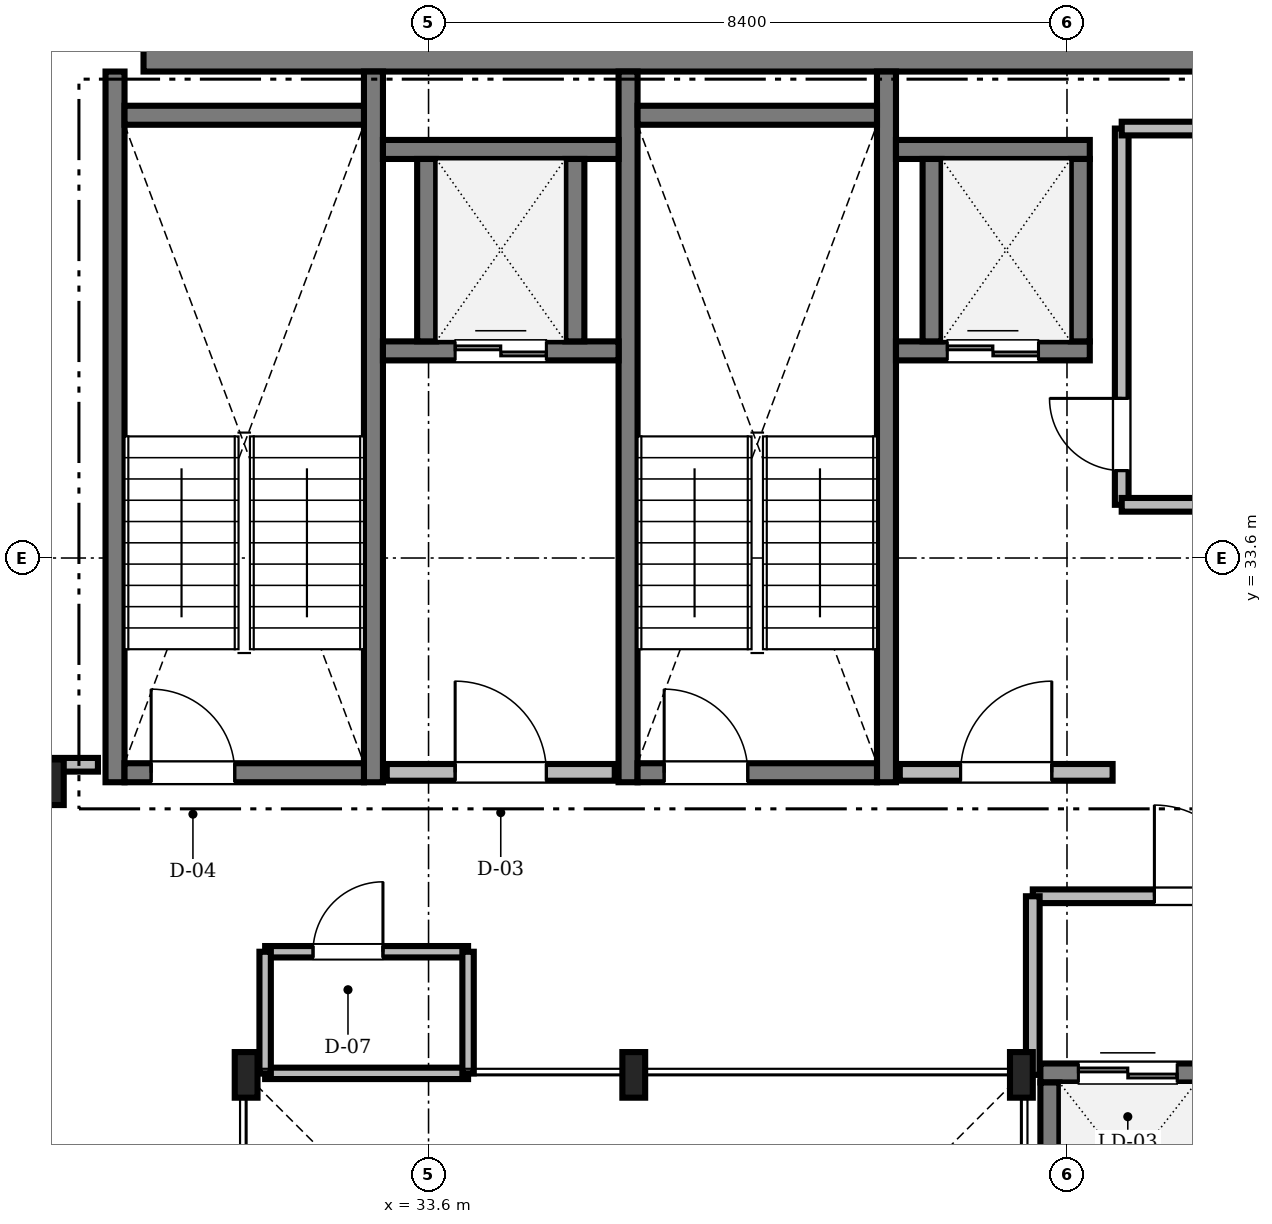
"""IFC4 building model, lengths in metres.
Left out: names, types, materials, properties, quantities, classifications, styles, units other than length and angle.
Written with IfcOpenShell. Run it as: python <this file> out.ifc"""

import sys

from ifc_helpers import new_model, si_unit, direction, frame, frame_2d, origin, origin_2d, place, context, subcontext, project, spatial, rectangle, i_section, extrude, source, transform, mapped, element, fill, save


model = new_model("IFC4")
c1 = context("Model", 3, precision=1e-05, world=origin(), true_north=direction((0.0, 1.0)))
c2 = subcontext(c1, "Body", "Model", "MODEL_VIEW")
j1 = project(units=[si_unit("LENGTHUNIT", "METRE"), si_unit("PLANEANGLEUNIT", "RADIAN")], contexts=[c1])
p1 = place(None, origin())
s1 = spatial("IfcSite", under=j1, at=p1, CompositionType="ELEMENT")
p2 = place(p1, origin())
s2 = spatial("IfcBuilding", under=s1, at=p2, CompositionType="ELEMENT")
p3 = place(p2, frame((0.0, 0.0, 262.45)))
s3 = spatial("IfcBuildingStorey", under=s2, at=p3, CompositionType="ELEMENT", Elevation=262.45)
m1 = source(origin(), c2, "Body", "SweptSolid", [
    extrude(rectangle(XDim=17.52, YDim=0.6, at=frame_2d((8.76, 0.0))), origin(), (0.0, 0.0, 1.0), 3.65),
])
p4 = place(p3, frame((29.85, 40.3, 0.0), z_axis=(0.0, 0.0, 1.0), x_axis=(1.0, 0.0, 0.0)))
e1 = element("IfcWall", 1, at=p4, inside=s3, PredefinedType="SHEAR", context=c2, shape_type="MappedRepresentation", body=[
    mapped(m1, transform((0.0, 0.0, 0.0), scale=1.0)),
])
m2 = source(origin(), c2, "Body", "SweptSolid", [
    extrude(i_section(OverallWidth=0.3, OverallDepth=0.6, WebThickness=0.015, FlangeThickness=0.03, FilletRadius=0.027, at=origin_2d()), origin(), (0.0, 0.0, 1.0), 3.65),
])
for number, where, z_axis, x_axis in (
    (2, (41.4, 26.8, 0.0), (0.0, 0.0, 1.0), (1.0, 0.0, 0.0)),
    (3, (36.3, 26.8, 0.0), (0.0, 0.0, 1.0), (1.0, 0.0, 0.0)),
    (4, (31.2, 26.8, 0.0), (0.0, 0.0, 1.0), (1.0, 0.0, 0.0)),
    (5, (28.65, 30.65, 0.0), (0.0, 0.0, 1.0), (1.0, 0.0, 0.0)),
):
    element("IfcColumn", number, at=place(p3, frame(where, z_axis=z_axis, x_axis=x_axis)), inside=s3, PredefinedType="COLUMN", context=c2, shape_type="MappedRepresentation", body=[
        mapped(m2, transform((0.0, 0.0, 0.0), scale=1.0)),
    ])
m3 = source(origin(), c2, "Body", "SweptSolid", [
    extrude(rectangle(XDim=9.35, YDim=0.25, at=frame_2d((4.675, 0.0))), origin(), (0.0, 0.0, 1.0), 3.75),
])
for number, where, z_axis, x_axis in (
    (6, (29.475, 30.65, 0.0), (0.0, 0.0, 1.0), (0.0, 1.0, 0.0)),
    (7, (32.875, 30.65, 0.0), (0.0, 0.0, 1.0), (0.0, 1.0, 0.0)),
):
    element("IfcWall", number, at=place(p3, frame(where, z_axis=z_axis, x_axis=x_axis)), inside=s3, PredefinedType="SOLIDWALL", context=c2, shape_type="MappedRepresentation", body=[
        mapped(m3, transform((0.0, 0.0, 0.0), scale=1.0)),
    ])
m4 = source(origin(), c2, "Body", "SweptSolid", [
    extrude(rectangle(XDim=3.15, YDim=0.25, at=frame_2d((1.575, 0.0))), origin(), (0.0, 0.0, 1.0), 3.75),
])
p5 = place(p3, frame((29.6, 39.425, 0.0), z_axis=(0.0, 0.0, 1.0), x_axis=(1.0, 0.0, 0.0)))
e8 = element("IfcWall", 8, at=p5, inside=s3, PredefinedType="SOLIDWALL", context=c2, shape_type="MappedRepresentation", body=[
    mapped(m4, transform((0.0, 0.0, 0.0), scale=1.0)),
])
p6 = place(p3, frame((29.6, 30.775, 0.0), z_axis=(0.0, 0.0, 1.0), x_axis=(1.0, 0.0, 0.0)))
e9 = element("IfcWall", 9, at=p6, inside=s3, PredefinedType="SOLIDWALL", context=c2, shape_type="MappedRepresentation", body=[
    mapped(m4, transform((0.0, 0.0, 0.0), scale=1.0)),
])
m5 = source(origin(), c2, "Body", "SweptSolid", [
    extrude(rectangle(XDim=1.1, YDim=2.2, at=frame_2d((0.55, 1.1))), frame((0.0, 0.135, 0.0), z_axis=(0.0, -1.0, 0.0), x_axis=(1.0, 0.0, 0.0)), (0.0, 0.0, 1.0), 0.27),
])
p7 = place(p6, frame((0.35, 0.0, 0.0)))
e10 = element("IfcOpeningElement", 10, at=p7, cuts=e9, PredefinedType="OPENING", context=c2, shape_type="MappedRepresentation", body=[
    mapped(m5, transform((0.0, 0.0, 0.0), scale=1.0)),
])
for number, where, z_axis, x_axis in (
    (11, (36.225, 30.65, 0.0), (0.0, 0.0, 1.0), (0.0, 1.0, 0.0)),
    (12, (39.625, 30.65, 0.0), (0.0, 0.0, 1.0), (0.0, 1.0, 0.0)),
):
    element("IfcWall", number, at=place(p3, frame(where, z_axis=z_axis, x_axis=x_axis)), inside=s3, PredefinedType="SOLIDWALL", context=c2, shape_type="MappedRepresentation", body=[
        mapped(m3, transform((0.0, 0.0, 0.0), scale=1.0)),
    ])
p8 = place(p3, frame((36.35, 39.425, 0.0), z_axis=(0.0, 0.0, 1.0), x_axis=(1.0, 0.0, 0.0)))
e13 = element("IfcWall", 13, at=p8, inside=s3, PredefinedType="SOLIDWALL", context=c2, shape_type="MappedRepresentation", body=[
    mapped(m4, transform((0.0, 0.0, 0.0), scale=1.0)),
])
p9 = place(p3, frame((36.35, 30.775, 0.0), z_axis=(0.0, 0.0, 1.0), x_axis=(1.0, 0.0, 0.0)))
e14 = element("IfcWall", 14, at=p9, inside=s3, PredefinedType="SOLIDWALL", context=c2, shape_type="MappedRepresentation", body=[
    mapped(m4, transform((0.0, 0.0, 0.0), scale=1.0)),
])
p10 = place(p9, frame((0.35, 0.0, 0.0)))
e15 = element("IfcOpeningElement", 15, at=p10, cuts=e14, PredefinedType="OPENING", context=c2, shape_type="MappedRepresentation", body=[
    mapped(m5, transform((0.0, 0.0, 0.0), scale=1.0)),
])
m6 = source(origin(), c2, "Body", "SweptSolid", [
    extrude(rectangle(XDim=3.0, YDim=0.22, at=frame_2d((1.5, 0.0))), origin(), (0.0, 0.0, 1.0), 3.65),
])
p11 = place(p3, frame((33.05, 30.78, 0.0), z_axis=(0.0, 0.0, 1.0), x_axis=(1.0, 0.0, 0.0)))
e16 = element("IfcWall", 16, at=p11, inside=s3, PredefinedType="SOLIDWALL", context=c2, shape_type="MappedRepresentation", body=[
    mapped(m6, transform((0.0, 0.0, 0.0), scale=1.0)),
])
m7 = source(origin(), c2, "Body", "SweptSolid", [
    extrude(rectangle(XDim=1.2, YDim=2.2, at=frame_2d((0.6, 1.1))), frame((0.0, 0.12, 0.0), z_axis=(0.0, -1.0, 0.0), x_axis=(1.0, 0.0, 0.0)), (0.0, 0.0, 1.0), 0.24),
])
p12 = place(p11, frame((0.9, 0.0, 0.0)))
e17 = element("IfcOpeningElement", 17, at=p12, cuts=e16, PredefinedType="OPENING", context=c2, shape_type="MappedRepresentation", body=[
    mapped(m7, transform((0.0, 0.0, 0.0), scale=1.0)),
])
m8 = source(origin(), c2, "Body", "SweptSolid", [
    extrude(rectangle(XDim=2.8, YDim=0.22, at=frame_2d((1.4, 0.0))), origin(), (0.0, 0.0, 1.0), 3.65),
])
p13 = place(p3, frame((39.8, 30.78, 0.0), z_axis=(0.0, 0.0, 1.0), x_axis=(1.0, 0.0, 0.0)))
e18 = element("IfcWall", 18, at=p13, inside=s3, PredefinedType="SOLIDWALL", context=c2, shape_type="MappedRepresentation", body=[
    mapped(m8, transform((0.0, 0.0, 0.0), scale=1.0)),
])
p14 = place(p13, frame((0.8, 0.0, 0.0)))
e19 = element("IfcOpeningElement", 19, at=p14, cuts=e18, PredefinedType="OPENING", context=c2, shape_type="MappedRepresentation", body=[
    mapped(m7, transform((0.0, 0.0, 0.0), scale=1.0)),
])
m9 = source(origin(), c2, "Body", "SweptSolid", [
    extrude(rectangle(XDim=3.1, YDim=0.25, at=frame_2d((1.55, 0.0))), origin(), (0.0, 0.0, 1.0), 3.65),
])
p15 = place(p3, frame((33.0, 36.325, 0.0), z_axis=(0.0, 0.0, 1.0), x_axis=(1.0, 0.0, 0.0)))
e20 = element("IfcWall", 20, at=p15, inside=s3, PredefinedType="SOLIDWALL", context=c2, shape_type="MappedRepresentation", body=[
    mapped(m9, transform((0.0, 0.0, 0.0), scale=1.0)),
])
m10 = source(origin(), c2, "Body", "SweptSolid", [
    extrude(rectangle(XDim=1.2, YDim=2.25, at=frame_2d((0.6, 1.125))), frame((0.0, 0.135, 0.0), z_axis=(0.0, -1.0, 0.0), x_axis=(1.0, 0.0, 0.0)), (0.0, 0.0, 1.0), 0.27),
])
p16 = place(p15, frame((0.95, 0.0, 0.0)))
e21 = element("IfcOpeningElement", 21, at=p16, cuts=e20, PredefinedType="OPENING", context=c2, shape_type="MappedRepresentation", body=[
    mapped(m10, transform((0.0, 0.0, 0.0), scale=1.0)),
])
p17 = place(p3, frame((33.0, 38.975, 0.0), z_axis=(0.0, 0.0, 1.0), x_axis=(1.0, 0.0, 0.0)))
e22 = element("IfcWall", 22, at=p17, inside=s3, PredefinedType="SOLIDWALL", context=c2, shape_type="MappedRepresentation", body=[
    mapped(m9, transform((0.0, 0.0, 0.0), scale=1.0)),
])
m11 = source(origin(), c2, "Body", "SweptSolid", [
    extrude(rectangle(XDim=2.4, YDim=0.25, at=frame_2d((1.2, 0.0))), origin(), (0.0, 0.0, 1.0), 3.65),
])
for number, where, z_axis, x_axis in (
    (23, (33.575, 36.45, 0.0), (0.0, 0.0, 1.0), (0.0, 1.0, 0.0)),
    (24, (35.525, 36.45, 0.0), (0.0, 0.0, 1.0), (0.0, 1.0, 0.0)),
):
    element("IfcWall", number, at=place(p3, frame(where, z_axis=z_axis, x_axis=x_axis)), inside=s3, PredefinedType="SOLIDWALL", context=c2, shape_type="MappedRepresentation", body=[
        mapped(m11, transform((0.0, 0.0, 0.0), scale=1.0)),
    ])
m12 = source(origin(), c2, "Body", "SweptSolid", [
    extrude(rectangle(XDim=2.55, YDim=0.25, at=frame_2d((1.275, 0.0))), origin(), (0.0, 0.0, 1.0), 3.65),
])
p18 = place(p3, frame((39.75, 36.325, 0.0), z_axis=(0.0, 0.0, 1.0), x_axis=(1.0, 0.0, 0.0)))
e25 = element("IfcWall", 25, at=p18, inside=s3, PredefinedType="SOLIDWALL", context=c2, shape_type="MappedRepresentation", body=[
    mapped(m12, transform((0.0, 0.0, 0.0), scale=1.0)),
])
p19 = place(p18, frame((0.675, 0.0, 0.0)))
e26 = element("IfcOpeningElement", 26, at=p19, cuts=e25, PredefinedType="OPENING", context=c2, shape_type="MappedRepresentation", body=[
    mapped(m10, transform((0.0, 0.0, 0.0), scale=1.0)),
])
p20 = place(p3, frame((39.75, 38.975, 0.0), z_axis=(0.0, 0.0, 1.0), x_axis=(1.0, 0.0, 0.0)))
e27 = element("IfcWall", 27, at=p20, inside=s3, PredefinedType="SOLIDWALL", context=c2, shape_type="MappedRepresentation", body=[
    mapped(m12, transform((0.0, 0.0, 0.0), scale=1.0)),
])
for number, where, z_axis, x_axis in (
    (28, (40.225, 36.45, 0.0), (0.0, 0.0, 1.0), (0.0, 1.0, 0.0)),
    (29, (42.175, 36.45, 0.0), (0.0, 0.0, 1.0), (0.0, 1.0, 0.0)),
):
    element("IfcWall", number, at=place(p3, frame(where, z_axis=z_axis, x_axis=x_axis)), inside=s3, PredefinedType="SOLIDWALL", context=c2, shape_type="MappedRepresentation", body=[
        mapped(m11, transform((0.0, 0.0, 0.0), scale=1.0)),
    ])
m13 = source(origin(), c2, "Body", "SweptSolid", [
    extrude(rectangle(XDim=2.3, YDim=0.25, at=frame_2d((1.15, 0.0))), origin(), (0.0, 0.0, 1.0), 3.65),
])
p21 = place(p3, frame((41.65, 26.825, 0.0), z_axis=(0.0, 0.0, 1.0), x_axis=(1.0, 0.0, 0.0)))
e30 = element("IfcWall", 30, at=p21, inside=s3, PredefinedType="SOLIDWALL", context=c2, shape_type="MappedRepresentation", body=[
    mapped(m13, transform((0.0, 0.0, 0.0), scale=1.0)),
])
m14 = source(origin(), c2, "Body", "SweptSolid", [
    extrude(rectangle(XDim=1.3, YDim=2.3, at=frame_2d((0.65, 1.15))), frame((0.0, 0.135, 0.0), z_axis=(0.0, -1.0, 0.0), x_axis=(1.0, 0.0, 0.0)), (0.0, 0.0, 1.0), 0.27),
])
p22 = place(p21, frame((0.5, 0.0, 0.0)))
e31 = element("IfcOpeningElement", 31, at=p22, cuts=e30, PredefinedType="OPENING", context=c2, shape_type="MappedRepresentation", body=[
    mapped(m14, transform((0.0, 0.0, 0.0), scale=1.0)),
])
p23 = place(p3, frame((41.775, 24.4, 0.0), z_axis=(0.0, 0.0, 1.0), x_axis=(0.0, 1.0, 0.0)))
e32 = element("IfcWall", 32, at=p23, inside=s3, PredefinedType="SOLIDWALL", context=c2, shape_type="MappedRepresentation", body=[
    mapped(m13, transform((0.0, 0.0, 0.0), scale=1.0)),
])
m15 = source(origin(), c2, "Body", "SweptSolid", [
    extrude(rectangle(XDim=12.248, YDim=0.18, at=frame_2d((6.124, 0.0))), origin(), (0.0, 0.0, 1.0), 2.892),
])
p24 = place(p3, frame((17.002, 30.88, 0.0), z_axis=(0.0, 0.0, 1.0), x_axis=(1.0, 0.0, 0.0)))
e33 = element("IfcWall", 33, at=p24, inside=s3, PredefinedType="PARTITIONING", context=c2, shape_type="MappedRepresentation", body=[
    mapped(m15, transform((0.0, 0.0, 0.0), scale=1.0)),
])
m16 = source(origin(), c2, "Body", "SweptSolid", [
    extrude(rectangle(XDim=1.05, YDim=2.2, at=frame_2d((0.525, 1.1))), frame((0.0, 0.1, 0.0), z_axis=(0.0, -1.0, 0.0), x_axis=(1.0, 0.0, 0.0)), (0.0, 0.0, 1.0), 0.2),
])
p25 = place(p24, frame((5.198, 0.0, 0.0)))
e34 = element("IfcOpeningElement", 34, at=p25, cuts=e33, PredefinedType="OPENING", context=c2, shape_type="MappedRepresentation", body=[
    mapped(m16, transform((0.0, 0.0, 0.0), scale=1.0)),
])
m17 = source(origin(), c2, "Body", "SweptSolid", [
    extrude(rectangle(XDim=4.95, YDim=0.18, at=frame_2d((2.475, 0.0))), origin(), (0.0, 0.0, 1.0), 3.65),
])
p26 = place(p3, frame((42.72, 34.3, 0.0), z_axis=(0.0, 0.0, 1.0), x_axis=(0.0, 1.0, 0.0)))
e35 = element("IfcWall", 35, at=p26, inside=s3, PredefinedType="PARTITIONING", context=c2, shape_type="MappedRepresentation", body=[
    mapped(m17, transform((0.0, 0.0, 0.0), scale=1.0)),
])
m18 = source(origin(), c2, "Body", "SweptSolid", [
    extrude(rectangle(XDim=0.95, YDim=2.15, at=frame_2d((0.475, 1.075))), frame((0.0, 0.1, 0.0), z_axis=(0.0, -1.0, 0.0), x_axis=(1.0, 0.0, 0.0)), (0.0, 0.0, 1.0), 0.2),
])
p27 = place(p26, frame((0.45, 0.0, 0.0)))
e36 = element("IfcOpeningElement", 36, at=p27, cuts=e35, PredefinedType="OPENING", context=c2, shape_type="MappedRepresentation", body=[
    mapped(m18, transform((0.0, 0.0, 0.0), scale=1.0)),
])
m19 = source(origin(), c2, "Body", "SweptSolid", [
    extrude(rectangle(XDim=4.648, YDim=0.18, at=frame_2d((2.324, 0.0))), origin(), (0.0, 0.0, 1.0), 3.282),
])
p28 = place(p3, frame((41.55, 29.15, 0.0), z_axis=(0.0, 0.0, 1.0), x_axis=(1.0, 0.0, 0.0)))
e37 = element("IfcWall", 37, at=p28, inside=s3, PredefinedType="PARTITIONING", context=c2, shape_type="MappedRepresentation", body=[
    mapped(m19, transform((0.0, 0.0, 0.0), scale=1.0)),
])
m20 = source(origin(), c2, "Body", "SweptSolid", [
    extrude(rectangle(XDim=1.2, YDim=2.2, at=frame_2d((0.6, 1.1))), frame((0.0, 0.1, 0.0), z_axis=(0.0, -1.0, 0.0), x_axis=(1.0, 0.0, 0.0)), (0.0, 0.0, 1.0), 0.2),
])
p29 = place(p28, frame((1.6, 0.0, 0.0)))
e38 = element("IfcOpeningElement", 38, at=p29, cuts=e37, PredefinedType="OPENING", context=c2, shape_type="MappedRepresentation", body=[
    mapped(m20, transform((0.0, 0.0, 0.0), scale=1.0)),
])
m21 = source(origin(), c2, "Body", "SweptSolid", [
    extrude(rectangle(XDim=2.67, YDim=0.15, at=frame_2d((1.335, 0.0))), origin(), (0.0, 0.0, 1.0), 3.282),
])
p30 = place(p3, frame((31.45, 28.42, 0.0), z_axis=(0.0, 0.0, 1.0), x_axis=(1.0, 0.0, 0.0)))
e39 = element("IfcWall", 39, at=p30, inside=s3, PredefinedType="PARTITIONING", context=c2, shape_type="MappedRepresentation", body=[
    mapped(m21, transform((0.0, 0.0, 0.0), scale=1.0)),
])
m22 = source(origin(), c2, "Body", "SweptSolid", [
    extrude(rectangle(XDim=0.92, YDim=2.1, at=frame_2d((0.46, 1.05))), frame((0.0, 0.085, 0.0), z_axis=(0.0, -1.0, 0.0), x_axis=(1.0, 0.0, 0.0)), (0.0, 0.0, 1.0), 0.17),
])
p31 = place(p30, frame((0.63, 0.0, 0.0)))
e40 = element("IfcOpeningElement", 40, at=p31, cuts=e39, PredefinedType="OPENING", context=c2, shape_type="MappedRepresentation", body=[
    mapped(m22, transform((0.0, 0.0, 0.0), scale=1.0)),
])
m23 = source(origin(), c2, "Body", "SweptSolid", [
    extrude(rectangle(XDim=2.67, YDim=0.15, at=frame_2d((1.335, 0.0))), origin(), (0.0, 0.0, 1.0), 3.192),
])
p32 = place(p3, frame((31.45, 26.82, 0.0), z_axis=(0.0, 0.0, 1.0), x_axis=(1.0, 0.0, 0.0)))
e41 = element("IfcWall", 41, at=p32, inside=s3, PredefinedType="PARTITIONING", context=c2, shape_type="MappedRepresentation", body=[
    mapped(m23, transform((0.0, 0.0, 0.0), scale=1.0)),
])
m24 = source(origin(), c2, "Body", "SweptSolid", [
    extrude(rectangle(XDim=2.35, YDim=0.18, at=frame_2d((1.175, 0.0))), origin(), (0.0, 0.0, 1.0), 3.282),
])
p33 = place(p3, frame((41.55, 26.8, 0.0), z_axis=(0.0, 0.0, 1.0), x_axis=(0.0, 1.0, 0.0)))
e42 = element("IfcWall", 42, at=p33, inside=s3, PredefinedType="PARTITIONING", context=c2, shape_type="MappedRepresentation", body=[
    mapped(m24, transform((0.0, 0.0, 0.0), scale=1.0)),
])
m25 = source(origin(), c2, "Body", "SweptSolid", [
    extrude(rectangle(XDim=1.6, YDim=0.15, at=frame_2d((0.8, 0.0))), origin(), (0.0, 0.0, 1.0), 3.192),
])
for number, where, z_axis, x_axis in (
    (43, (31.45, 26.82, 0.0), (0.0, 0.0, 1.0), (0.0, 1.0, 0.0)),
    (44, (34.12, 26.82, 0.0), (0.0, 0.0, 1.0), (0.0, 1.0, 0.0)),
):
    element("IfcWall", number, at=place(p3, frame(where, z_axis=z_axis, x_axis=x_axis)), inside=s3, PredefinedType="PARTITIONING", context=c2, shape_type="MappedRepresentation", body=[
        mapped(m25, transform((0.0, 0.0, 0.0), scale=1.0)),
    ])
m26 = source(origin(), c2, "Body", "SweptSolid", [
    extrude(rectangle(XDim=1.128, YDim=0.18, at=frame_2d((0.564, 0.0))), origin(), (0.0, 0.0, 1.0), 3.65),
])
for number, where, z_axis, x_axis in (
    (45, (42.72, 34.3, 0.0), (0.0, 0.0, 1.0), (1.0, 0.0, 0.0)),
    (46, (42.72, 39.25, 0.0), (0.0, 0.0, 1.0), (1.0, 0.0, 0.0)),
):
    element("IfcWall", number, at=place(p3, frame(where, z_axis=z_axis, x_axis=x_axis)), inside=s3, PredefinedType="PARTITIONING", context=c2, shape_type="MappedRepresentation", body=[
        mapped(m26, transform((0.0, 0.0, 0.0), scale=1.0)),
    ])
m27 = source(origin(), c2, "Body", "SweptSolid", [
    extrude(rectangle(XDim=1.1, YDim=2.2, at=frame_2d((0.55, 1.1))), frame((0.0, 0.025, 0.0), z_axis=(0.0, -1.0, 0.0), x_axis=(1.0, 0.0, 0.0)), (0.0, 0.0, 1.0), 0.05),
])
p34 = place(p7, origin())
e47 = element("IfcDoor", 47, at=p34, inside=s3, OperationType="SINGLE_SWING_LEFT", PredefinedType="DOOR", context=c2, shape_type="MappedRepresentation", body=[
    mapped(m27, transform((0.0, 0.0, 0.0), scale=1.0)),
])
fill(e10, e47)
p35 = place(p10, origin())
e48 = element("IfcDoor", 48, at=p35, inside=s3, OperationType="SINGLE_SWING_LEFT", PredefinedType="DOOR", context=c2, shape_type="MappedRepresentation", body=[
    mapped(m27, transform((0.0, 0.0, 0.0), scale=1.0)),
])
fill(e15, e48)
m28 = source(origin(), c2, "Body", "SweptSolid", [
    extrude(rectangle(XDim=1.2, YDim=2.2, at=frame_2d((0.6, 1.1))), frame((0.0, 0.025, 0.0), z_axis=(0.0, -1.0, 0.0), x_axis=(1.0, 0.0, 0.0)), (0.0, 0.0, 1.0), 0.05),
])
p36 = place(p12, origin())
e49 = element("IfcDoor", 49, at=p36, inside=s3, OperationType="SINGLE_SWING_LEFT", PredefinedType="DOOR", context=c2, shape_type="MappedRepresentation", body=[
    mapped(m28, transform((0.0, 0.0, 0.0), scale=1.0)),
])
fill(e17, e49)
p37 = place(p14, origin())
e50 = element("IfcDoor", 50, at=p37, inside=s3, OperationType="SINGLE_SWING_RIGHT", PredefinedType="DOOR", context=c2, shape_type="MappedRepresentation", body=[
    mapped(m28, transform((0.0, 0.0, 0.0), scale=1.0)),
])
fill(e19, e50)
m29 = source(origin(), c2, "Body", "SweptSolid", [
    extrude(rectangle(XDim=1.2, YDim=2.25, at=frame_2d((0.6, 1.125))), frame((0.0, 0.025, 0.0), z_axis=(0.0, -1.0, 0.0), x_axis=(1.0, 0.0, 0.0)), (0.0, 0.0, 1.0), 0.05),
])
p38 = place(p16, origin())
e51 = element("IfcDoor", 51, at=p38, inside=s3, OperationType="DOUBLE_DOOR_SLIDING", PredefinedType="DOOR", context=c2, shape_type="MappedRepresentation", body=[
    mapped(m29, transform((0.0, 0.0, 0.0), scale=1.0)),
])
fill(e21, e51)
p39 = place(p19, origin())
e52 = element("IfcDoor", 52, at=p39, inside=s3, OperationType="DOUBLE_DOOR_SLIDING", PredefinedType="DOOR", context=c2, shape_type="MappedRepresentation", body=[
    mapped(m29, transform((0.0, 0.0, 0.0), scale=1.0)),
])
fill(e26, e52)
m30 = source(origin(), c2, "Body", "SweptSolid", [
    extrude(rectangle(XDim=1.3, YDim=2.3, at=frame_2d((0.65, 1.15))), frame((0.0, 0.025, 0.0), z_axis=(0.0, -1.0, 0.0), x_axis=(1.0, 0.0, 0.0)), (0.0, 0.0, 1.0), 0.05),
])
p40 = place(p22, origin())
e53 = element("IfcDoor", 53, at=p40, inside=s3, OperationType="DOUBLE_DOOR_SLIDING", PredefinedType="DOOR", context=c2, shape_type="MappedRepresentation", body=[
    mapped(m30, transform((0.0, 0.0, 0.0), scale=1.0)),
])
fill(e31, e53)
m31 = source(origin(), c2, "Body", "SweptSolid", [
    extrude(rectangle(XDim=0.95, YDim=2.15, at=frame_2d((0.475, 1.075))), frame((0.0, 0.025, 0.0), z_axis=(0.0, -1.0, 0.0), x_axis=(1.0, 0.0, 0.0)), (0.0, 0.0, 1.0), 0.05),
])
p41 = place(p27, origin())
e54 = element("IfcDoor", 54, at=p41, inside=s3, OperationType="SINGLE_SWING_RIGHT", PredefinedType="DOOR", context=c2, shape_type="MappedRepresentation", body=[
    mapped(m31, transform((0.0, 0.0, 0.0), scale=1.0)),
])
fill(e36, e54)
p42 = place(p29, origin())
e55 = element("IfcDoor", 55, at=p42, inside=s3, OperationType="SINGLE_SWING_LEFT", PredefinedType="DOOR", context=c2, shape_type="MappedRepresentation", body=[
    mapped(m28, transform((0.0, 0.0, 0.0), scale=1.0)),
])
fill(e38, e55)
m32 = source(origin(), c2, "Body", "SweptSolid", [
    extrude(rectangle(XDim=0.92, YDim=2.1, at=frame_2d((0.46, 1.05))), frame((0.0, 0.025, 0.0), z_axis=(0.0, -1.0, 0.0), x_axis=(1.0, 0.0, 0.0)), (0.0, 0.0, 1.0), 0.05),
])
p43 = place(p31, origin())
e56 = element("IfcDoor", 56, at=p43, inside=s3, OperationType="SINGLE_SWING_RIGHT", PredefinedType="DOOR", context=c2, shape_type="MappedRepresentation", body=[
    mapped(m32, transform((0.0, 0.0, 0.0), scale=1.0)),
])
fill(e40, e56)
save(model, sys.argv[1])
